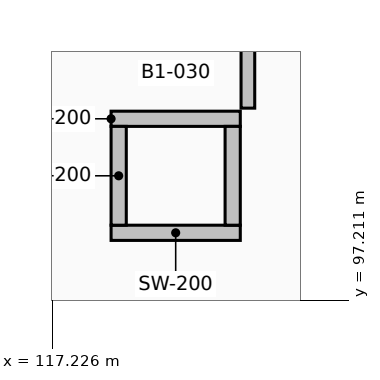
"""IFC4 building model, lengths in metres.
Left out: names, types, materials, properties, quantities, classifications, styles, units other than length and angle.
Written with IfcOpenShell. Run it as: python <this file> out.ifc"""

import sys

from ifc_helpers import new_model, si_unit, direction, frame, frame_2d, origin, place, context, subcontext, project, spatial, rectangle, extrude, element, save


model = new_model("IFC4")
c1 = context("Model", 3, precision=1e-05, world=origin(), true_north=direction((0.0, 1.0)))
c2 = subcontext(c1, "Body", "Model", "MODEL_VIEW")
j1 = project(units=[si_unit("LENGTHUNIT", "METRE"), si_unit("PLANEANGLEUNIT", "RADIAN")], contexts=[c1])
p1 = place(None, origin())
s1 = spatial("IfcSite", under=j1, at=p1, CompositionType="ELEMENT")
p2 = place(p1, origin())
s2 = spatial("IfcBuilding", under=s1, at=p2, CompositionType="ELEMENT")
p3 = place(p2, frame((0.0, 0.0, -4.8)))
s3 = spatial("IfcBuildingStorey", under=s2, at=p3, CompositionType="ELEMENT", Elevation=-4.8)
for number, where, z_axis, x_axis in (
    (1, (118.0, 98.1, 0.0), (0.0, 0.0, 1.0), (1.0, 0.0, 0.0)),
    (2, (119.7, 99.6, 0.0), (0.0, 0.0, 1.0), (-1.0, 0.0, 0.0)),
):
    element("IfcWall", number, at=place(p3, frame(where, z_axis=z_axis, x_axis=x_axis)), inside=s3, PredefinedType="PARTITIONING", context=c2, shape_type="SweptSolid", body=[
        extrude(rectangle(XDim=1.7, YDim=0.2, at=frame_2d((0.85, 0.0))), origin(), (0.0, 0.0, 1.0), 4.5),
    ])
for number, where, z_axis, x_axis in (
    (3, (118.1, 98.2, 0.0), (0.0, 0.0, 1.0), (0.0, 1.0, 0.0)),
    (4, (119.6, 99.5, 0.0), (0.0, 0.0, 1.0), (0.0, -1.0, 0.0)),
):
    element("IfcWall", number, at=place(p3, frame(where, z_axis=z_axis, x_axis=x_axis)), inside=s3, PredefinedType="PARTITIONING", context=c2, shape_type="SweptSolid", body=[
        extrude(rectangle(XDim=1.3, YDim=0.2, at=frame_2d((0.65, 0.0))), origin(), (0.0, 0.0, 1.0), 4.5),
    ])
p4 = place(p3, frame((119.8, 99.74, 0.0), z_axis=(0.0, 0.0, 1.0), x_axis=(0.0, 1.0, 0.0)))
e5 = element("IfcWall", 5, at=p4, inside=s3, PredefinedType="PARTITIONING", context=c2, shape_type="SweptSolid", body=[
    extrude(rectangle(XDim=5.31, YDim=0.18, at=frame_2d((2.655, 0.0))), origin(), (0.0, 0.0, 1.0), 4.492),
])
p5 = place(p4, frame((1.485, 0.0, 0.0)))
e6 = element("IfcOpeningElement", 6, at=p5, cuts=e5, PredefinedType="OPENING", context=c2, shape_type="SweptSolid", body=[
    extrude(rectangle(XDim=1.2, YDim=2.1, at=frame_2d((0.6, 1.05))), frame((0.0, 0.1, 0.0), z_axis=(0.0, -1.0, 0.0), x_axis=(1.0, 0.0, 0.0)), (0.0, 0.0, 1.0), 0.2),
])
save(model, sys.argv[1])
